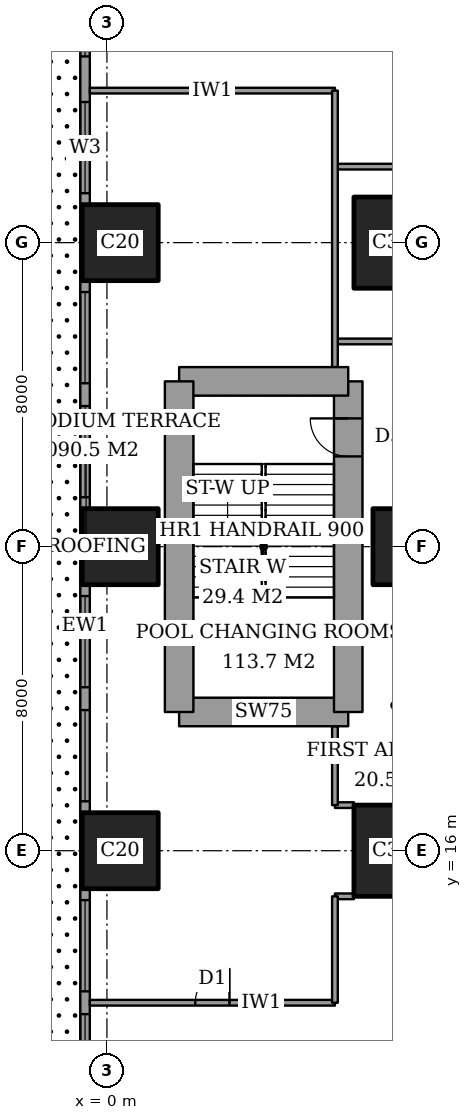
"""IFC4 building model, lengths in metres.
Left out: names, types, materials, properties, quantities, classifications, styles, units other than length and angle.
Written with IfcOpenShell. Run it as: python <this file> out.ifc"""

import sys

from ifc_helpers import new_model, si_unit, direction, frame, frame_2d, origin, origin_2d, place, context, subcontext, project, spatial, rectangle, extrude, element, fill, save


model = new_model("IFC4")
c1 = context("Model", 3, precision=1e-05, world=origin(), true_north=direction((0.0, 1.0)))
c2 = subcontext(c1, "Body", "Model", "MODEL_VIEW")
j1 = project(units=[si_unit("LENGTHUNIT", "METRE"), si_unit("PLANEANGLEUNIT", "RADIAN")], contexts=[c1])
p1 = place(None, origin())
s1 = spatial("IfcSite", under=j1, at=p1, CompositionType="ELEMENT")
p2 = place(p1, origin())
s2 = spatial("IfcBuilding", under=s1, at=p2, CompositionType="ELEMENT")
p3 = place(p2, frame((0.0, 0.0, 16.0)))
s3 = spatial("IfcBuildingStorey", under=s2, at=p3, CompositionType="ELEMENT", Elevation=16.0)
for number, where, z_axis, x_axis in (
    (1, (0.35, 16.0, 0.0), (0.0, 0.0, 1.0), (1.0, 0.0, 0.0)),
    (2, (0.35, 24.0, 0.0), (0.0, 0.0, 1.0), (1.0, 0.0, 0.0)),
    (3, (0.35, 32.0, 0.0), (0.0, 0.0, 1.0), (1.0, 0.0, 0.0)),
):
    element("IfcColumn", number, at=place(p3, frame(where, z_axis=z_axis, x_axis=x_axis)), inside=s3, PredefinedType="COLUMN", context=c2, shape_type="SweptSolid", body=[
        extrude(rectangle(XDim=2.0, YDim=2.0, at=origin_2d()), origin(), (0.0, 0.0, 1.0), 5.0),
    ])
p4 = place(p3, frame((8.0, 16.0, 0.0), z_axis=(0.0, 0.0, 1.0), x_axis=(1.0, 0.0, 0.0)))
e4 = element("IfcColumn", 4, at=p4, inside=s3, PredefinedType="COLUMN", context=c2, shape_type="SweptSolid", body=[
    extrude(rectangle(XDim=3.0, YDim=2.4, at=origin_2d()), origin(), (0.0, 0.0, 1.0), 5.0),
])
p5 = place(p3, frame((8.0, 24.0, 0.0), z_axis=(0.0, 0.0, 1.0), x_axis=(1.0, 0.0, 0.0)))
e5 = element("IfcColumn", 5, at=p5, inside=s3, PredefinedType="COLUMN", context=c2, shape_type="SweptSolid", body=[
    extrude(rectangle(XDim=2.0, YDim=2.0, at=origin_2d()), origin(), (0.0, 0.0, 1.0), 5.0),
])
p6 = place(p3, frame((8.0, 32.0, 0.0), z_axis=(0.0, 0.0, 1.0), x_axis=(1.0, 0.0, 0.0)))
e6 = element("IfcColumn", 6, at=p6, inside=s3, PredefinedType="COLUMN", context=c2, shape_type="SweptSolid", body=[
    extrude(rectangle(XDim=3.0, YDim=2.4, at=origin_2d()), origin(), (0.0, 0.0, 1.0), 5.0),
])
p7 = place(p3, frame((1.9, 19.65, 0.0), z_axis=(0.0, 0.0, 1.0), x_axis=(1.0, 0.0, 0.0)))
e7 = element("IfcWall", 7, at=p7, inside=s3, PredefinedType="SHEAR", context=c2, shape_type="SweptSolid", body=[
    extrude(rectangle(XDim=4.45, YDim=0.75, at=frame_2d((2.225, 0.0))), origin(), (0.0, 0.0, 1.0), 5.0),
])
p8 = place(p3, frame((6.35, 19.65, 0.0), z_axis=(0.0, 0.0, 1.0), x_axis=(0.0, 1.0, 0.0)))
e8 = element("IfcWall", 8, at=p8, inside=s3, PredefinedType="SHEAR", context=c2, shape_type="SweptSolid", body=[
    extrude(rectangle(XDim=8.7, YDim=0.75, at=frame_2d((4.35, 0.0))), origin(), (0.0, 0.0, 1.0), 5.0),
])
p9 = place(p8, frame((6.725, 0.0, 0.0)))
e9 = element("IfcOpeningElement", 9, at=p9, cuts=e8, PredefinedType="OPENING", context=c2, shape_type="SweptSolid", body=[
    extrude(rectangle(XDim=1.0, YDim=2.1, at=frame_2d((0.5, 1.05))), frame((0.0, 0.385, 0.0), z_axis=(0.0, -1.0, 0.0), x_axis=(1.0, 0.0, 0.0)), (0.0, 0.0, 1.0), 0.77),
])
p10 = place(p3, frame((6.35, 28.35, 0.0), z_axis=(0.0, 0.0, 1.0), x_axis=(-1.0, 0.0, 0.0)))
e10 = element("IfcWall", 10, at=p10, inside=s3, PredefinedType="SHEAR", context=c2, shape_type="SweptSolid", body=[
    extrude(rectangle(XDim=4.45, YDim=0.75, at=frame_2d((2.225, 0.0))), origin(), (0.0, 0.0, 1.0), 5.0),
])
p11 = place(p3, frame((1.9, 28.35, 0.0), z_axis=(0.0, 0.0, 1.0), x_axis=(0.0, -1.0, 0.0)))
e11 = element("IfcWall", 11, at=p11, inside=s3, PredefinedType="SHEAR", context=c2, shape_type="SweptSolid", body=[
    extrude(rectangle(XDim=8.7, YDim=0.75, at=frame_2d((4.35, 0.0))), origin(), (0.0, 0.0, 1.0), 5.0),
])
p12 = place(p3, frame((-0.575, 44.825, 0.0), z_axis=(0.0, 0.0, 1.0), x_axis=(0.0, -1.0, 0.0)))
e12 = element("IfcWall", 12, at=p12, inside=s3, PredefinedType="SOLIDWALL", context=c2, shape_type="SweptSolid", body=[
    extrude(rectangle(XDim=41.65, YDim=0.25, at=frame_2d((20.825, 0.0))), origin(), (0.0, 0.0, 1.0), 5.0),
])
p13 = place(p12, frame((2.675, 0.0, 0.0)))
e13 = element("IfcOpeningElement", 13, at=p13, cuts=e12, PredefinedType="OPENING", context=c2, shape_type="SweptSolid", body=[
    extrude(rectangle(XDim=1.0, YDim=2.4, at=frame_2d((0.5, 1.2))), frame((0.0, 0.135, 0.0), z_axis=(0.0, -1.0, 0.0), x_axis=(1.0, 0.0, 0.0)), (0.0, 0.0, 1.0), 0.27),
])
p14 = place(p12, frame((6.725, 0.0, 0.6)))
e14 = element("IfcOpeningElement", 14, at=p14, cuts=e12, PredefinedType="OPENING", context=c2, shape_type="SweptSolid", body=[
    extrude(rectangle(XDim=1.2, YDim=3.0, at=frame_2d((0.6, 1.5))), frame((0.0, 0.135, 0.0), z_axis=(0.0, -1.0, 0.0), x_axis=(1.0, 0.0, 0.0)), (0.0, 0.0, 1.0), 0.27),
])
p15 = place(p12, frame((9.125, 0.0, 0.6)))
e15 = element("IfcOpeningElement", 15, at=p15, cuts=e12, PredefinedType="OPENING", context=c2, shape_type="SweptSolid", body=[
    extrude(rectangle(XDim=2.4, YDim=3.0, at=frame_2d((1.2, 1.5))), frame((0.0, 0.135, 0.0), z_axis=(0.0, -1.0, 0.0), x_axis=(1.0, 0.0, 0.0)), (0.0, 0.0, 1.0), 0.27),
])
p16 = place(p12, frame((14.125, 0.0, 0.6)))
e16 = element("IfcOpeningElement", 16, at=p16, cuts=e12, PredefinedType="OPENING", context=c2, shape_type="SweptSolid", body=[
    extrude(rectangle(XDim=2.4, YDim=3.0, at=frame_2d((1.2, 1.5))), frame((0.0, 0.135, 0.0), z_axis=(0.0, -1.0, 0.0), x_axis=(1.0, 0.0, 0.0)), (0.0, 0.0, 1.0), 0.27),
])
p17 = place(p12, frame((17.125, 0.0, 0.6)))
e17 = element("IfcOpeningElement", 17, at=p17, cuts=e12, PredefinedType="OPENING", context=c2, shape_type="SweptSolid", body=[
    extrude(rectangle(XDim=2.4, YDim=3.0, at=frame_2d((1.2, 1.5))), frame((0.0, 0.135, 0.0), z_axis=(0.0, -1.0, 0.0), x_axis=(1.0, 0.0, 0.0)), (0.0, 0.0, 1.0), 0.27),
])
p18 = place(p12, frame((22.125, 0.0, 0.6)))
e18 = element("IfcOpeningElement", 18, at=p18, cuts=e12, PredefinedType="OPENING", context=c2, shape_type="SweptSolid", body=[
    extrude(rectangle(XDim=2.4, YDim=3.0, at=frame_2d((1.2, 1.5))), frame((0.0, 0.135, 0.0), z_axis=(0.0, -1.0, 0.0), x_axis=(1.0, 0.0, 0.0)), (0.0, 0.0, 1.0), 0.27),
])
p19 = place(p12, frame((25.125, 0.0, 0.6)))
e19 = element("IfcOpeningElement", 19, at=p19, cuts=e12, PredefinedType="OPENING", context=c2, shape_type="SweptSolid", body=[
    extrude(rectangle(XDim=2.4, YDim=3.0, at=frame_2d((1.2, 1.5))), frame((0.0, 0.135, 0.0), z_axis=(0.0, -1.0, 0.0), x_axis=(1.0, 0.0, 0.0)), (0.0, 0.0, 1.0), 0.27),
])
p20 = place(p12, frame((30.125, 0.0, 0.6)))
e20 = element("IfcOpeningElement", 20, at=p20, cuts=e12, PredefinedType="OPENING", context=c2, shape_type="SweptSolid", body=[
    extrude(rectangle(XDim=2.4, YDim=3.0, at=frame_2d((1.2, 1.5))), frame((0.0, 0.135, 0.0), z_axis=(0.0, -1.0, 0.0), x_axis=(1.0, 0.0, 0.0)), (0.0, 0.0, 1.0), 0.27),
])
p21 = place(p12, frame((37.975, 0.0, 0.0)))
e21 = element("IfcOpeningElement", 21, at=p21, cuts=e12, PredefinedType="OPENING", context=c2, shape_type="SweptSolid", body=[
    extrude(rectangle(XDim=1.0, YDim=2.4, at=frame_2d((0.5, 1.2))), frame((0.0, 0.135, 0.0), z_axis=(0.0, -1.0, 0.0), x_axis=(1.0, 0.0, 0.0)), (0.0, 0.0, 1.0), 0.27),
])
p22 = place(p12, frame((33.125, 0.0, 0.6)))
e22 = element("IfcOpeningElement", 22, at=p22, cuts=e12, PredefinedType="OPENING", context=c2, shape_type="SweptSolid", body=[
    extrude(rectangle(XDim=2.4, YDim=3.0, at=frame_2d((1.2, 1.5))), frame((0.0, 0.135, 0.0), z_axis=(0.0, -1.0, 0.0), x_axis=(1.0, 0.0, 0.0)), (0.0, 0.0, 1.0), 0.27),
])
p23 = place(p3, frame((-0.45, 12.0, 0.0), z_axis=(0.0, 0.0, 1.0), x_axis=(1.0, 0.0, 0.0)))
e23 = element("IfcWall", 23, at=p23, inside=s3, PredefinedType="PARTITIONING", context=c2, shape_type="SweptSolid", body=[
    extrude(rectangle(XDim=6.45, YDim=0.15, at=frame_2d((3.225, 0.0))), origin(), (0.0, 0.0, 1.0), 4.7),
])
p24 = place(p23, frame((2.775, 0.0, 0.0)))
e24 = element("IfcOpeningElement", 24, at=p24, cuts=e23, PredefinedType="OPENING", context=c2, shape_type="SweptSolid", body=[
    extrude(rectangle(XDim=0.9, YDim=2.1, at=frame_2d((0.45, 1.05))), frame((0.0, 0.085, 0.0), z_axis=(0.0, -1.0, 0.0), x_axis=(1.0, 0.0, 0.0)), (0.0, 0.0, 1.0), 0.17),
])
for number, where, z_axis, x_axis in (
    (25, (6.0, 14.8, 0.0), (0.0, 0.0, 1.0), (1.0, 0.0, 0.0)),
    (26, (6.0, 17.2, 0.0), (0.0, 0.0, 1.0), (1.0, 0.0, 0.0)),
):
    element("IfcWall", number, at=place(p3, frame(where, z_axis=z_axis, x_axis=x_axis)), inside=s3, PredefinedType="PARTITIONING", context=c2, shape_type="SweptSolid", body=[
        extrude(rectangle(XDim=0.5, YDim=0.15, at=frame_2d((0.25, 0.0))), origin(), (0.0, 0.0, 1.0), 4.7),
    ])
p25 = place(p3, frame((6.0, 29.4, 0.0), z_axis=(0.0, 0.0, 1.0), x_axis=(1.0, 0.0, 0.0)))
e27 = element("IfcWall", 27, at=p25, inside=s3, PredefinedType="PARTITIONING", context=c2, shape_type="SweptSolid", body=[
    extrude(rectangle(XDim=12.9, YDim=0.15, at=frame_2d((6.45, 0.0))), origin(), (0.0, 0.0, 1.0), 4.7),
])
p26 = place(p25, frame((5.95, 0.0, 0.0)))
e28 = element("IfcOpeningElement", 28, at=p26, cuts=e27, PredefinedType="OPENING", context=c2, shape_type="SweptSolid", body=[
    extrude(rectangle(XDim=1.0, YDim=2.1, at=frame_2d((0.5, 1.05))), frame((0.0, 0.085, 0.0), z_axis=(0.0, -1.0, 0.0), x_axis=(1.0, 0.0, 0.0)), (0.0, 0.0, 1.0), 0.17),
])
p27 = place(p3, frame((6.0, 34.0, 0.0), z_axis=(0.0, 0.0, 1.0), x_axis=(1.0, 0.0, 0.0)))
e29 = element("IfcWall", 29, at=p27, inside=s3, PredefinedType="PARTITIONING", context=c2, shape_type="SweptSolid", body=[
    extrude(rectangle(XDim=16.45, YDim=0.15, at=frame_2d((8.225, 0.0))), origin(), (0.0, 0.0, 1.0), 4.7),
])
p28 = place(p27, frame((5.55, 0.0, 0.0)))
e30 = element("IfcOpeningElement", 30, at=p28, cuts=e29, PredefinedType="OPENING", context=c2, shape_type="SweptSolid", body=[
    extrude(rectangle(XDim=1.8, YDim=2.1, at=frame_2d((0.9, 1.05))), frame((0.0, 0.085, 0.0), z_axis=(0.0, -1.0, 0.0), x_axis=(1.0, 0.0, 0.0)), (0.0, 0.0, 1.0), 0.17),
])
p29 = place(p3, frame((-0.45, 36.0, 0.0), z_axis=(0.0, 0.0, 1.0), x_axis=(1.0, 0.0, 0.0)))
e31 = element("IfcWall", 31, at=p29, inside=s3, PredefinedType="PARTITIONING", context=c2, shape_type="SweptSolid", body=[
    extrude(rectangle(XDim=6.45, YDim=0.15, at=frame_2d((3.225, 0.0))), origin(), (0.0, 0.0, 1.0), 4.7),
])
p30 = place(p3, frame((6.0, 12.0, 0.0), z_axis=(0.0, 0.0, 1.0), x_axis=(0.0, 1.0, 0.0)))
e32 = element("IfcWall", 32, at=p30, inside=s3, PredefinedType="PARTITIONING", context=c2, shape_type="SweptSolid", body=[
    extrude(rectangle(XDim=2.8, YDim=0.15, at=frame_2d((1.4, 0.0))), origin(), (0.0, 0.0, 1.0), 4.7),
])
p31 = place(p3, frame((6.0, 17.2, 0.0), z_axis=(0.0, 0.0, 1.0), x_axis=(0.0, 1.0, 0.0)))
e33 = element("IfcWall", 33, at=p31, inside=s3, PredefinedType="PARTITIONING", context=c2, shape_type="SweptSolid", body=[
    extrude(rectangle(XDim=2.075, YDim=0.15, at=frame_2d((1.038, 0.0))), origin(), (0.0, 0.0, 1.0), 4.7),
])
p32 = place(p3, frame((6.0, 28.725, 0.0), z_axis=(0.0, 0.0, 1.0), x_axis=(0.0, 1.0, 0.0)))
e34 = element("IfcWall", 34, at=p32, inside=s3, PredefinedType="PARTITIONING", context=c2, shape_type="SweptSolid", body=[
    extrude(rectangle(XDim=7.275, YDim=0.15, at=frame_2d((3.637, 0.0))), origin(), (0.0, 0.0, 1.0), 4.7),
])
p33 = place(p14, origin())
e35 = element("IfcWindow", 35, at=p33, inside=s3, PartitioningType="SINGLE_PANEL", PredefinedType="WINDOW", context=c2, shape_type="SweptSolid", body=[
    extrude(rectangle(XDim=1.2, YDim=3.0, at=frame_2d((0.6, 1.5))), frame((0.0, 0.03, 0.0), z_axis=(0.0, -1.0, 0.0), x_axis=(1.0, 0.0, 0.0)), (0.0, 0.0, 1.0), 0.06),
])
fill(e14, e35)
p34 = place(p15, origin())
e36 = element("IfcWindow", 36, at=p34, inside=s3, PartitioningType="SINGLE_PANEL", PredefinedType="WINDOW", context=c2, shape_type="SweptSolid", body=[
    extrude(rectangle(XDim=2.4, YDim=3.0, at=frame_2d((1.2, 1.5))), frame((0.0, 0.03, 0.0), z_axis=(0.0, -1.0, 0.0), x_axis=(1.0, 0.0, 0.0)), (0.0, 0.0, 1.0), 0.06),
])
fill(e15, e36)
p35 = place(p16, origin())
e37 = element("IfcWindow", 37, at=p35, inside=s3, PartitioningType="SINGLE_PANEL", PredefinedType="WINDOW", context=c2, shape_type="SweptSolid", body=[
    extrude(rectangle(XDim=2.4, YDim=3.0, at=frame_2d((1.2, 1.5))), frame((0.0, 0.03, 0.0), z_axis=(0.0, -1.0, 0.0), x_axis=(1.0, 0.0, 0.0)), (0.0, 0.0, 1.0), 0.06),
])
fill(e16, e37)
p36 = place(p17, origin())
e38 = element("IfcWindow", 38, at=p36, inside=s3, PartitioningType="SINGLE_PANEL", PredefinedType="WINDOW", context=c2, shape_type="SweptSolid", body=[
    extrude(rectangle(XDim=2.4, YDim=3.0, at=frame_2d((1.2, 1.5))), frame((0.0, 0.03, 0.0), z_axis=(0.0, -1.0, 0.0), x_axis=(1.0, 0.0, 0.0)), (0.0, 0.0, 1.0), 0.06),
])
fill(e17, e38)
p37 = place(p18, origin())
e39 = element("IfcWindow", 39, at=p37, inside=s3, PartitioningType="SINGLE_PANEL", PredefinedType="WINDOW", context=c2, shape_type="SweptSolid", body=[
    extrude(rectangle(XDim=2.4, YDim=3.0, at=frame_2d((1.2, 1.5))), frame((0.0, 0.03, 0.0), z_axis=(0.0, -1.0, 0.0), x_axis=(1.0, 0.0, 0.0)), (0.0, 0.0, 1.0), 0.06),
])
fill(e18, e39)
p38 = place(p19, origin())
e40 = element("IfcWindow", 40, at=p38, inside=s3, PartitioningType="SINGLE_PANEL", PredefinedType="WINDOW", context=c2, shape_type="SweptSolid", body=[
    extrude(rectangle(XDim=2.4, YDim=3.0, at=frame_2d((1.2, 1.5))), frame((0.0, 0.03, 0.0), z_axis=(0.0, -1.0, 0.0), x_axis=(1.0, 0.0, 0.0)), (0.0, 0.0, 1.0), 0.06),
])
fill(e19, e40)
p39 = place(p20, origin())
e41 = element("IfcWindow", 41, at=p39, inside=s3, PartitioningType="SINGLE_PANEL", PredefinedType="WINDOW", context=c2, shape_type="SweptSolid", body=[
    extrude(rectangle(XDim=2.4, YDim=3.0, at=frame_2d((1.2, 1.5))), frame((0.0, 0.03, 0.0), z_axis=(0.0, -1.0, 0.0), x_axis=(1.0, 0.0, 0.0)), (0.0, 0.0, 1.0), 0.06),
])
fill(e20, e41)
p40 = place(p22, origin())
e42 = element("IfcWindow", 42, at=p40, inside=s3, PartitioningType="SINGLE_PANEL", PredefinedType="WINDOW", context=c2, shape_type="SweptSolid", body=[
    extrude(rectangle(XDim=2.4, YDim=3.0, at=frame_2d((1.2, 1.5))), frame((0.0, 0.03, 0.0), z_axis=(0.0, -1.0, 0.0), x_axis=(1.0, 0.0, 0.0)), (0.0, 0.0, 1.0), 0.06),
])
fill(e22, e42)
p41 = place(p24, origin())
e43 = element("IfcDoor", 43, at=p41, inside=s3, OperationType="SINGLE_SWING_LEFT", PredefinedType="DOOR", context=c2, shape_type="SweptSolid", body=[
    extrude(rectangle(XDim=0.9, YDim=2.1, at=frame_2d((0.45, 1.05))), frame((0.0, 0.025, 0.0), z_axis=(0.0, -1.0, 0.0), x_axis=(1.0, 0.0, 0.0)), (0.0, 0.0, 1.0), 0.05),
])
fill(e24, e43)
p42 = place(p9, origin())
e44 = element("IfcDoor", 44, at=p42, inside=s3, OperationType="SINGLE_SWING_LEFT", PredefinedType="DOOR", context=c2, shape_type="SweptSolid", body=[
    extrude(rectangle(XDim=1.0, YDim=2.1, at=frame_2d((0.5, 1.05))), frame((0.0, 0.025, 0.0), z_axis=(0.0, -1.0, 0.0), x_axis=(1.0, 0.0, 0.0)), (0.0, 0.0, 1.0), 0.05),
])
fill(e9, e44)
save(model, sys.argv[1])
